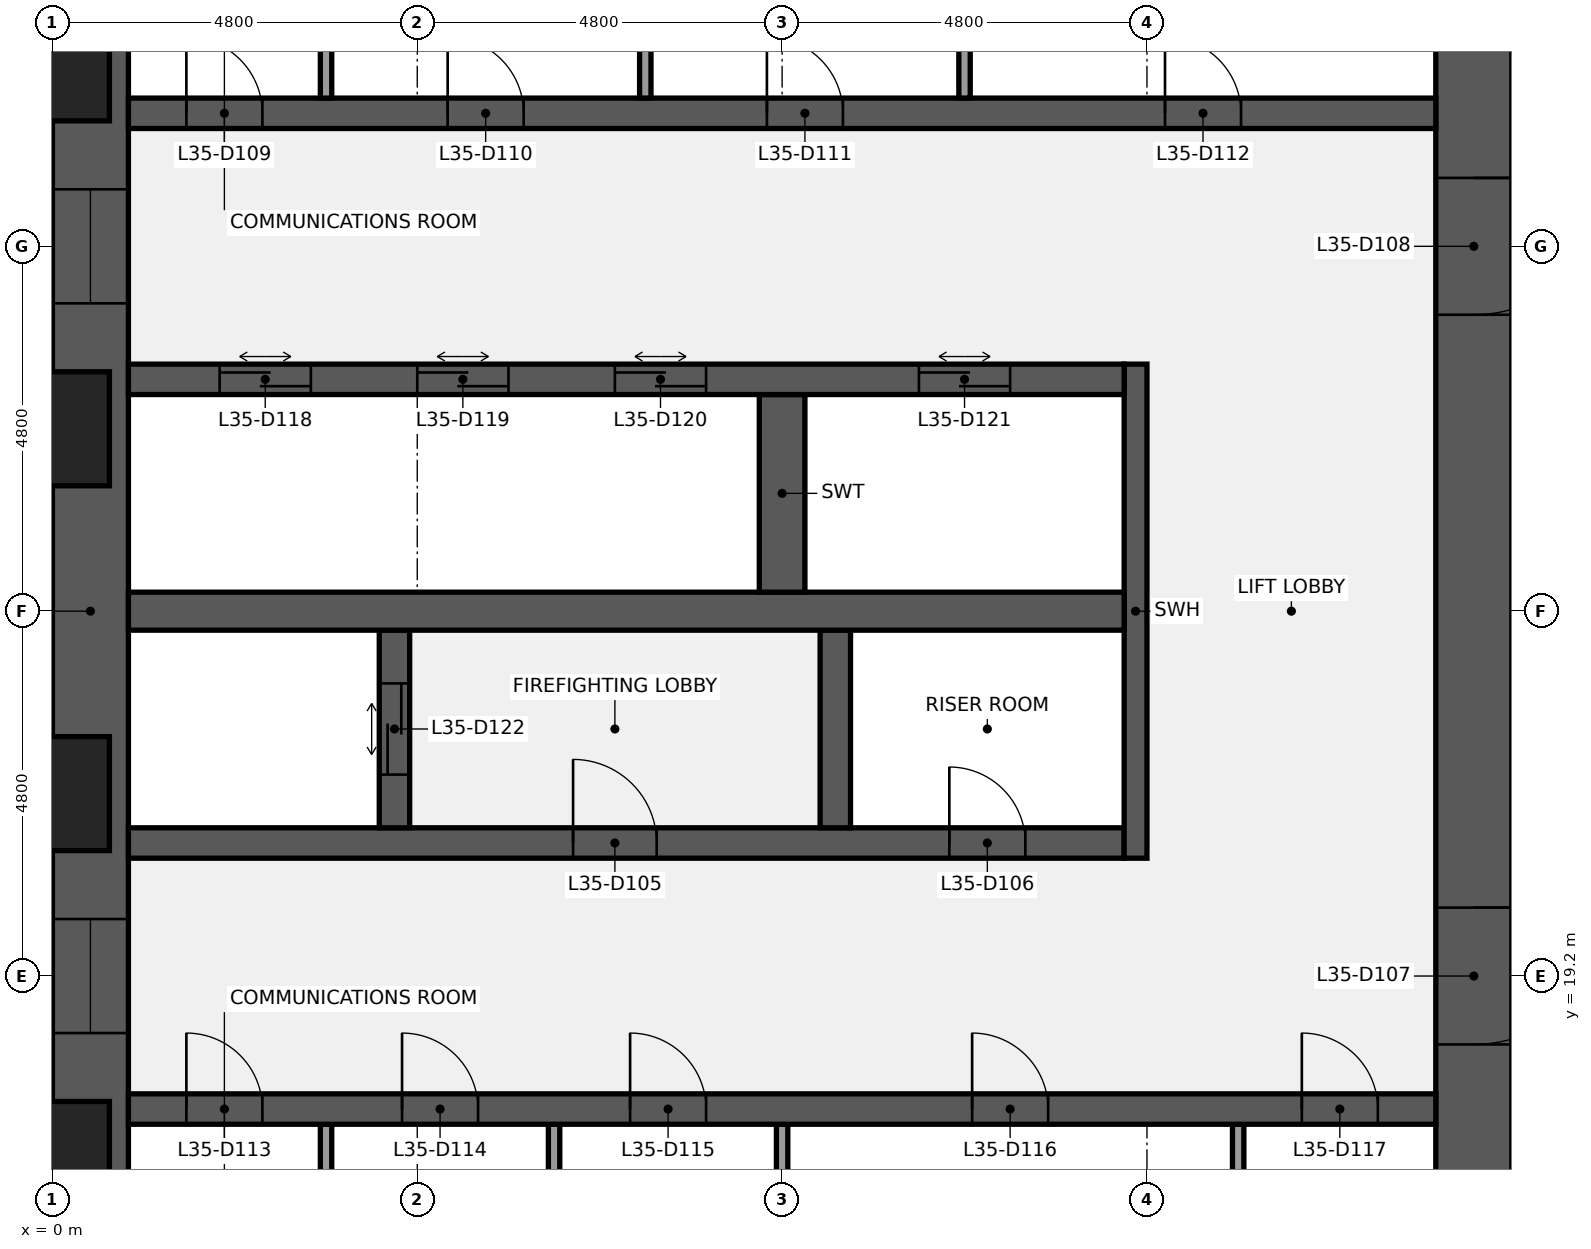
"""IFC4 building model, lengths in metres.
Left out: names, types, materials, properties, quantities, classifications, styles, units other than length and angle.
Written with IfcOpenShell. Run it as: python <this file> out.ifc"""

import sys

from ifc_helpers import new_model, si_unit, direction, frame, frame_2d, origin, place, context, subcontext, project, spatial, rectangle, extrude, element, fill, save


model = new_model("IFC4")
c1 = context("Model", 3, precision=1e-05, world=origin(), true_north=direction((0.0, 1.0)))
c2 = subcontext(c1, "Body", "Model", "MODEL_VIEW")
j1 = project(units=[si_unit("LENGTHUNIT", "METRE"), si_unit("PLANEANGLEUNIT", "RADIAN")], contexts=[c1])
p1 = place(None, origin())
s1 = spatial("IfcSite", under=j1, at=p1, CompositionType="ELEMENT")
p2 = place(p1, origin())
s2 = spatial("IfcBuilding", under=s1, at=p2, CompositionType="ELEMENT")
p3 = place(p2, frame((0.0, 0.0, 160.1)))
s3 = spatial("IfcBuildingStorey", under=s2, at=p3, CompositionType="ELEMENT", Elevation=160.1)
p4 = place(p3, frame((0.5, 9.6, 0.0), z_axis=(0.0, 0.0, 1.0), x_axis=(0.0, 1.0, 0.0)))
e1 = element("IfcWall", 1, at=p4, inside=s3, PredefinedType="SHEAR", context=c2, shape_type="SweptSolid", body=[
    extrude(rectangle(XDim=28.8, YDim=1.0, at=frame_2d((14.4, 0.0))), origin(), (0.0, 0.0, 1.0), 3.84),
])
p5 = place(p4, frame((8.85, 0.0, 0.9)))
e2 = element("IfcOpeningElement", 2, at=p5, cuts=e1, PredefinedType="OPENING", context=c2, shape_type="SweptSolid", body=[
    extrude(rectangle(XDim=1.5, YDim=1.5, at=frame_2d((0.75, 0.75))), frame((0.0, 0.51, 0.0), z_axis=(0.0, -1.0, 0.0), x_axis=(1.0, 0.0, 0.0)), (0.0, 0.0, 1.0), 1.02),
])
p6 = place(p4, frame((18.45, 0.0, 0.9)))
e3 = element("IfcOpeningElement", 3, at=p6, cuts=e1, PredefinedType="OPENING", context=c2, shape_type="SweptSolid", body=[
    extrude(rectangle(XDim=1.5, YDim=1.5, at=frame_2d((0.75, 0.75))), frame((0.0, 0.51, 0.0), z_axis=(0.0, -1.0, 0.0), x_axis=(1.0, 0.0, 0.0)), (0.0, 0.0, 1.0), 1.02),
])
p7 = place(p3, frame((18.7, 38.4, 0.0), z_axis=(0.0, 0.0, 1.0), x_axis=(0.0, -1.0, 0.0)))
e4 = element("IfcWall", 4, at=p7, inside=s3, PredefinedType="SHEAR", context=c2, shape_type="SweptSolid", body=[
    extrude(rectangle(XDim=28.8, YDim=1.0, at=frame_2d((14.4, 0.0))), origin(), (0.0, 0.0, 1.0), 3.84),
])
p8 = place(p7, frame((18.3, 0.0, 0.0)))
e5 = element("IfcOpeningElement", 5, at=p8, cuts=e4, PredefinedType="OPENING", context=c2, shape_type="SweptSolid", body=[
    extrude(rectangle(XDim=1.8, YDim=2.1, at=frame_2d((0.9, 1.05))), frame((0.0, 0.51, 0.0), z_axis=(0.0, -1.0, 0.0), x_axis=(1.0, 0.0, 0.0)), (0.0, 0.0, 1.0), 1.02),
])
p9 = place(p7, frame((8.7, 0.0, 0.0)))
e6 = element("IfcOpeningElement", 6, at=p9, cuts=e4, PredefinedType="OPENING", context=c2, shape_type="SweptSolid", body=[
    extrude(rectangle(XDim=1.8, YDim=2.1, at=frame_2d((0.9, 1.05))), frame((0.0, 0.51, 0.0), z_axis=(0.0, -1.0, 0.0), x_axis=(1.0, 0.0, 0.0)), (0.0, 0.0, 1.0), 1.02),
])
for number, where, z_axis, x_axis in (
    (7, (3.6, 14.65, 0.0), (0.0, 0.0, 1.0), (0.0, 1.0, 0.0)),
    (8, (6.6, 14.65, 0.0), (0.0, 0.0, 1.0), (0.0, 1.0, 0.0)),
    (9, (9.6, 14.65, 0.0), (0.0, 0.0, 1.0), (0.0, 1.0, 0.0)),
    (10, (15.6, 14.65, 0.0), (0.0, 0.0, 1.0), (0.0, 1.0, 0.0)),
):
    element("IfcWall", number, at=place(p3, frame(where, z_axis=z_axis, x_axis=x_axis)), inside=s3, PredefinedType="PARTITIONING", context=c2, shape_type="SweptSolid", body=[
        extrude(rectangle(XDim=2.6, YDim=0.15, at=frame_2d((1.3, 0.0))), origin(), (0.0, 0.0, 1.0), 3.84),
    ])
p10 = place(p3, frame((1.0, 17.45, 0.0), z_axis=(0.0, 0.0, 1.0), x_axis=(1.0, 0.0, 0.0)))
e11 = element("IfcWall", 11, at=p10, inside=s3, PredefinedType="SHEAR", context=c2, shape_type="SweptSolid", body=[
    extrude(rectangle(XDim=17.2, YDim=0.4, at=frame_2d((8.6, 0.0))), origin(), (0.0, 0.0, 1.0), 3.84),
])
p11 = place(p10, frame((0.762, 0.0, 0.0)))
e12 = element("IfcOpeningElement", 12, at=p11, cuts=e11, PredefinedType="OPENING", context=c2, shape_type="SweptSolid", body=[
    extrude(rectangle(XDim=1.0, YDim=2.1, at=frame_2d((0.5, 1.05))), frame((0.0, 0.21, 0.0), z_axis=(0.0, -1.0, 0.0), x_axis=(1.0, 0.0, 0.0)), (0.0, 0.0, 1.0), 0.42),
])
p12 = place(p10, frame((3.6, 0.0, 0.0)))
e13 = element("IfcOpeningElement", 13, at=p12, cuts=e11, PredefinedType="OPENING", context=c2, shape_type="SweptSolid", body=[
    extrude(rectangle(XDim=1.0, YDim=2.1, at=frame_2d((0.5, 1.05))), frame((0.0, 0.21, 0.0), z_axis=(0.0, -1.0, 0.0), x_axis=(1.0, 0.0, 0.0)), (0.0, 0.0, 1.0), 0.42),
])
p13 = place(p10, frame((6.6, 0.0, 0.0)))
e14 = element("IfcOpeningElement", 14, at=p13, cuts=e11, PredefinedType="OPENING", context=c2, shape_type="SweptSolid", body=[
    extrude(rectangle(XDim=1.0, YDim=2.1, at=frame_2d((0.5, 1.05))), frame((0.0, 0.21, 0.0), z_axis=(0.0, -1.0, 0.0), x_axis=(1.0, 0.0, 0.0)), (0.0, 0.0, 1.0), 0.42),
])
p14 = place(p10, frame((11.1, 0.0, 0.0)))
e15 = element("IfcOpeningElement", 15, at=p14, cuts=e11, PredefinedType="OPENING", context=c2, shape_type="SweptSolid", body=[
    extrude(rectangle(XDim=1.0, YDim=2.1, at=frame_2d((0.5, 1.05))), frame((0.0, 0.21, 0.0), z_axis=(0.0, -1.0, 0.0), x_axis=(1.0, 0.0, 0.0)), (0.0, 0.0, 1.0), 0.42),
])
p15 = place(p10, frame((15.438, 0.0, 0.0)))
e16 = element("IfcOpeningElement", 16, at=p15, cuts=e11, PredefinedType="OPENING", context=c2, shape_type="SweptSolid", body=[
    extrude(rectangle(XDim=1.0, YDim=2.1, at=frame_2d((0.5, 1.05))), frame((0.0, 0.21, 0.0), z_axis=(0.0, -1.0, 0.0), x_axis=(1.0, 0.0, 0.0)), (0.0, 0.0, 1.0), 0.42),
])
p16 = place(p3, frame((1.0, 20.95, 0.0), z_axis=(0.0, 0.0, 1.0), x_axis=(1.0, 0.0, 0.0)))
e17 = element("IfcWall", 17, at=p16, inside=s3, PredefinedType="SHEAR", context=c2, shape_type="SweptSolid", body=[
    extrude(rectangle(XDim=13.1, YDim=0.4, at=frame_2d((6.55, 0.0))), origin(), (0.0, 0.0, 1.0), 3.84),
])
p17 = place(p16, frame((5.85, 0.0, 0.0)))
e18 = element("IfcOpeningElement", 18, at=p17, cuts=e17, PredefinedType="OPENING", context=c2, shape_type="SweptSolid", body=[
    extrude(rectangle(XDim=1.1, YDim=2.1, at=frame_2d((0.55, 1.05))), frame((0.0, 0.21, 0.0), z_axis=(0.0, -1.0, 0.0), x_axis=(1.0, 0.0, 0.0)), (0.0, 0.0, 1.0), 0.42),
])
p18 = place(p16, frame((10.8, 0.0, 0.0)))
e19 = element("IfcOpeningElement", 19, at=p18, cuts=e17, PredefinedType="OPENING", context=c2, shape_type="SweptSolid", body=[
    extrude(rectangle(XDim=1.0, YDim=2.1, at=frame_2d((0.5, 1.05))), frame((0.0, 0.21, 0.0), z_axis=(0.0, -1.0, 0.0), x_axis=(1.0, 0.0, 0.0)), (0.0, 0.0, 1.0), 0.42),
])
p19 = place(p3, frame((14.25, 20.75, 0.0), z_axis=(0.0, 0.0, 1.0), x_axis=(0.0, 1.0, 0.0)))
e20 = element("IfcWall", 20, at=p19, inside=s3, PredefinedType="SHEAR", context=c2, shape_type="SweptSolid", body=[
    extrude(rectangle(XDim=6.5, YDim=0.3, at=frame_2d((3.25, 0.0))), origin(), (0.0, 0.0, 1.0), 3.84),
])
p20 = place(p3, frame((4.5, 21.15, 0.0), z_axis=(0.0, 0.0, 1.0), x_axis=(0.0, 1.0, 0.0)))
e21 = element("IfcWall", 21, at=p20, inside=s3, PredefinedType="SHEAR", context=c2, shape_type="SweptSolid", body=[
    extrude(rectangle(XDim=2.6, YDim=0.4, at=frame_2d((1.3, 0.0))), origin(), (0.0, 0.0, 1.0), 3.84),
])
p21 = place(p20, frame((0.7, 0.0, 0.0)))
e22 = element("IfcOpeningElement", 22, at=p21, cuts=e21, PredefinedType="OPENING", context=c2, shape_type="SweptSolid", body=[
    extrude(rectangle(XDim=1.2, YDim=2.1, at=frame_2d((0.6, 1.05))), frame((0.0, 0.21, 0.0), z_axis=(0.0, -1.0, 0.0), x_axis=(1.0, 0.0, 0.0)), (0.0, 0.0, 1.0), 0.42),
])
p22 = place(p3, frame((10.3, 21.15, 0.0), z_axis=(0.0, 0.0, 1.0), x_axis=(0.0, 1.0, 0.0)))
e23 = element("IfcWall", 23, at=p22, inside=s3, PredefinedType="SHEAR", context=c2, shape_type="SweptSolid", body=[
    extrude(rectangle(XDim=2.6, YDim=0.4, at=frame_2d((1.3, 0.0))), origin(), (0.0, 0.0, 1.0), 3.84),
])
p23 = place(p3, frame((1.0, 24.0, 0.0), z_axis=(0.0, 0.0, 1.0), x_axis=(1.0, 0.0, 0.0)))
e24 = element("IfcWall", 24, at=p23, inside=s3, PredefinedType="SHEAR", context=c2, shape_type="SweptSolid", body=[
    extrude(rectangle(XDim=13.1, YDim=0.5, at=frame_2d((6.55, 0.0))), origin(), (0.0, 0.0, 1.0), 3.84),
])
p24 = place(p3, frame((9.6, 24.25, 0.0), z_axis=(0.0, 0.0, 1.0), x_axis=(0.0, 1.0, 0.0)))
e25 = element("IfcWall", 25, at=p24, inside=s3, PredefinedType="SHEAR", context=c2, shape_type="SweptSolid", body=[
    extrude(rectangle(XDim=2.6, YDim=0.6, at=frame_2d((1.3, 0.0))), origin(), (0.0, 0.0, 1.0), 3.84),
])
p25 = place(p3, frame((1.0, 27.05, 0.0), z_axis=(0.0, 0.0, 1.0), x_axis=(1.0, 0.0, 0.0)))
e26 = element("IfcWall", 26, at=p25, inside=s3, PredefinedType="SHEAR", context=c2, shape_type="SweptSolid", body=[
    extrude(rectangle(XDim=13.1, YDim=0.4, at=frame_2d((6.55, 0.0))), origin(), (0.0, 0.0, 1.0), 3.84),
])
p26 = place(p25, frame((1.2, 0.0, 0.0)))
e27 = element("IfcOpeningElement", 27, at=p26, cuts=e26, PredefinedType="OPENING", context=c2, shape_type="SweptSolid", body=[
    extrude(rectangle(XDim=1.2, YDim=2.1, at=frame_2d((0.6, 1.05))), frame((0.0, 0.21, 0.0), z_axis=(0.0, -1.0, 0.0), x_axis=(1.0, 0.0, 0.0)), (0.0, 0.0, 1.0), 0.42),
])
p27 = place(p25, frame((3.8, 0.0, 0.0)))
e28 = element("IfcOpeningElement", 28, at=p27, cuts=e26, PredefinedType="OPENING", context=c2, shape_type="SweptSolid", body=[
    extrude(rectangle(XDim=1.2, YDim=2.1, at=frame_2d((0.6, 1.05))), frame((0.0, 0.21, 0.0), z_axis=(0.0, -1.0, 0.0), x_axis=(1.0, 0.0, 0.0)), (0.0, 0.0, 1.0), 0.42),
])
p28 = place(p25, frame((6.4, 0.0, 0.0)))
e29 = element("IfcOpeningElement", 29, at=p28, cuts=e26, PredefinedType="OPENING", context=c2, shape_type="SweptSolid", body=[
    extrude(rectangle(XDim=1.2, YDim=2.1, at=frame_2d((0.6, 1.05))), frame((0.0, 0.21, 0.0), z_axis=(0.0, -1.0, 0.0), x_axis=(1.0, 0.0, 0.0)), (0.0, 0.0, 1.0), 0.42),
])
p29 = place(p25, frame((10.4, 0.0, 0.0)))
e30 = element("IfcOpeningElement", 30, at=p29, cuts=e26, PredefinedType="OPENING", context=c2, shape_type="SweptSolid", body=[
    extrude(rectangle(XDim=1.2, YDim=2.1, at=frame_2d((0.6, 1.05))), frame((0.0, 0.21, 0.0), z_axis=(0.0, -1.0, 0.0), x_axis=(1.0, 0.0, 0.0)), (0.0, 0.0, 1.0), 0.42),
])
p30 = place(p3, frame((1.0, 30.55, 0.0), z_axis=(0.0, 0.0, 1.0), x_axis=(1.0, 0.0, 0.0)))
e31 = element("IfcWall", 31, at=p30, inside=s3, PredefinedType="SHEAR", context=c2, shape_type="SweptSolid", body=[
    extrude(rectangle(XDim=17.2, YDim=0.4, at=frame_2d((8.6, 0.0))), origin(), (0.0, 0.0, 1.0), 3.84),
])
p31 = place(p30, frame((0.762, 0.0, 0.0)))
e32 = element("IfcOpeningElement", 32, at=p31, cuts=e31, PredefinedType="OPENING", context=c2, shape_type="SweptSolid", body=[
    extrude(rectangle(XDim=1.0, YDim=2.1, at=frame_2d((0.5, 1.05))), frame((0.0, 0.21, 0.0), z_axis=(0.0, -1.0, 0.0), x_axis=(1.0, 0.0, 0.0)), (0.0, 0.0, 1.0), 0.42),
])
p32 = place(p30, frame((4.2, 0.0, 0.0)))
e33 = element("IfcOpeningElement", 33, at=p32, cuts=e31, PredefinedType="OPENING", context=c2, shape_type="SweptSolid", body=[
    extrude(rectangle(XDim=1.0, YDim=2.1, at=frame_2d((0.5, 1.05))), frame((0.0, 0.21, 0.0), z_axis=(0.0, -1.0, 0.0), x_axis=(1.0, 0.0, 0.0)), (0.0, 0.0, 1.0), 0.42),
])
p33 = place(p30, frame((8.4, 0.0, 0.0)))
e34 = element("IfcOpeningElement", 34, at=p33, cuts=e31, PredefinedType="OPENING", context=c2, shape_type="SweptSolid", body=[
    extrude(rectangle(XDim=1.0, YDim=2.1, at=frame_2d((0.5, 1.05))), frame((0.0, 0.21, 0.0), z_axis=(0.0, -1.0, 0.0), x_axis=(1.0, 0.0, 0.0)), (0.0, 0.0, 1.0), 0.42),
])
p34 = place(p30, frame((13.637, 0.0, 0.0)))
e35 = element("IfcOpeningElement", 35, at=p34, cuts=e31, PredefinedType="OPENING", context=c2, shape_type="SweptSolid", body=[
    extrude(rectangle(XDim=1.0, YDim=2.1, at=frame_2d((0.5, 1.05))), frame((0.0, 0.21, 0.0), z_axis=(0.0, -1.0, 0.0), x_axis=(1.0, 0.0, 0.0)), (0.0, 0.0, 1.0), 0.42),
])
for number, where, z_axis, x_axis in (
    (36, (3.6, 30.75, 0.0), (0.0, 0.0, 1.0), (0.0, 1.0, 0.0)),
    (37, (7.8, 30.75, 0.0), (0.0, 0.0, 1.0), (0.0, 1.0, 0.0)),
    (38, (12.0, 30.75, 0.0), (0.0, 0.0, 1.0), (0.0, 1.0, 0.0)),
):
    element("IfcWall", number, at=place(p3, frame(where, z_axis=z_axis, x_axis=x_axis)), inside=s3, PredefinedType="PARTITIONING", context=c2, shape_type="SweptSolid", body=[
        extrude(rectangle(XDim=2.6, YDim=0.15, at=frame_2d((1.3, 0.0))), origin(), (0.0, 0.0, 1.0), 3.84),
    ])
p35 = place(p17, origin())
e39 = element("IfcDoor", 39, at=p35, inside=s3, OperationType="SINGLE_SWING_LEFT", PredefinedType="DOOR", context=c2, shape_type="SweptSolid", body=[
    extrude(rectangle(XDim=1.1, YDim=2.1, at=frame_2d((0.55, 1.05))), frame((0.0, 0.025, 0.0), z_axis=(0.0, -1.0, 0.0), x_axis=(1.0, 0.0, 0.0)), (0.0, 0.0, 1.0), 0.05),
])
fill(e18, e39)
p36 = place(p18, origin())
e40 = element("IfcDoor", 40, at=p36, inside=s3, OperationType="SINGLE_SWING_LEFT", PredefinedType="DOOR", context=c2, shape_type="SweptSolid", body=[
    extrude(rectangle(XDim=1.0, YDim=2.1, at=frame_2d((0.5, 1.05))), frame((0.0, 0.025, 0.0), z_axis=(0.0, -1.0, 0.0), x_axis=(1.0, 0.0, 0.0)), (0.0, 0.0, 1.0), 0.05),
])
fill(e19, e40)
p37 = place(p8, origin())
e41 = element("IfcDoor", 41, at=p37, inside=s3, OperationType="DOUBLE_DOOR_SINGLE_SWING", PredefinedType="DOOR", context=c2, shape_type="SweptSolid", body=[
    extrude(rectangle(XDim=1.8, YDim=2.1, at=frame_2d((0.9, 1.05))), frame((0.0, 0.025, 0.0), z_axis=(0.0, -1.0, 0.0), x_axis=(1.0, 0.0, 0.0)), (0.0, 0.0, 1.0), 0.05),
])
fill(e5, e41)
p38 = place(p9, origin())
e42 = element("IfcDoor", 42, at=p38, inside=s3, OperationType="DOUBLE_DOOR_SINGLE_SWING", PredefinedType="DOOR", context=c2, shape_type="SweptSolid", body=[
    extrude(rectangle(XDim=1.8, YDim=2.1, at=frame_2d((0.9, 1.05))), frame((0.0, 0.025, 0.0), z_axis=(0.0, -1.0, 0.0), x_axis=(1.0, 0.0, 0.0)), (0.0, 0.0, 1.0), 0.05),
])
fill(e6, e42)
p39 = place(p31, origin())
e43 = element("IfcDoor", 43, at=p39, inside=s3, OperationType="SINGLE_SWING_LEFT", PredefinedType="DOOR", context=c2, shape_type="SweptSolid", body=[
    extrude(rectangle(XDim=1.0, YDim=2.1, at=frame_2d((0.5, 1.05))), frame((0.0, 0.025, 0.0), z_axis=(0.0, -1.0, 0.0), x_axis=(1.0, 0.0, 0.0)), (0.0, 0.0, 1.0), 0.05),
])
fill(e32, e43)
p40 = place(p32, origin())
e44 = element("IfcDoor", 44, at=p40, inside=s3, OperationType="SINGLE_SWING_LEFT", PredefinedType="DOOR", context=c2, shape_type="SweptSolid", body=[
    extrude(rectangle(XDim=1.0, YDim=2.1, at=frame_2d((0.5, 1.05))), frame((0.0, 0.025, 0.0), z_axis=(0.0, -1.0, 0.0), x_axis=(1.0, 0.0, 0.0)), (0.0, 0.0, 1.0), 0.05),
])
fill(e33, e44)
p41 = place(p33, origin())
e45 = element("IfcDoor", 45, at=p41, inside=s3, OperationType="SINGLE_SWING_LEFT", PredefinedType="DOOR", context=c2, shape_type="SweptSolid", body=[
    extrude(rectangle(XDim=1.0, YDim=2.1, at=frame_2d((0.5, 1.05))), frame((0.0, 0.025, 0.0), z_axis=(0.0, -1.0, 0.0), x_axis=(1.0, 0.0, 0.0)), (0.0, 0.0, 1.0), 0.05),
])
fill(e34, e45)
p42 = place(p34, origin())
e46 = element("IfcDoor", 46, at=p42, inside=s3, OperationType="SINGLE_SWING_LEFT", PredefinedType="DOOR", context=c2, shape_type="SweptSolid", body=[
    extrude(rectangle(XDim=1.0, YDim=2.1, at=frame_2d((0.5, 1.05))), frame((0.0, 0.025, 0.0), z_axis=(0.0, -1.0, 0.0), x_axis=(1.0, 0.0, 0.0)), (0.0, 0.0, 1.0), 0.05),
])
fill(e35, e46)
p43 = place(p11, origin())
e47 = element("IfcDoor", 47, at=p43, inside=s3, OperationType="SINGLE_SWING_LEFT", PredefinedType="DOOR", context=c2, shape_type="SweptSolid", body=[
    extrude(rectangle(XDim=1.0, YDim=2.1, at=frame_2d((0.5, 1.05))), frame((0.0, 0.025, 0.0), z_axis=(0.0, -1.0, 0.0), x_axis=(1.0, 0.0, 0.0)), (0.0, 0.0, 1.0), 0.05),
])
fill(e12, e47)
p44 = place(p12, origin())
e48 = element("IfcDoor", 48, at=p44, inside=s3, OperationType="SINGLE_SWING_LEFT", PredefinedType="DOOR", context=c2, shape_type="SweptSolid", body=[
    extrude(rectangle(XDim=1.0, YDim=2.1, at=frame_2d((0.5, 1.05))), frame((0.0, 0.025, 0.0), z_axis=(0.0, -1.0, 0.0), x_axis=(1.0, 0.0, 0.0)), (0.0, 0.0, 1.0), 0.05),
])
fill(e13, e48)
p45 = place(p13, origin())
e49 = element("IfcDoor", 49, at=p45, inside=s3, OperationType="SINGLE_SWING_LEFT", PredefinedType="DOOR", context=c2, shape_type="SweptSolid", body=[
    extrude(rectangle(XDim=1.0, YDim=2.1, at=frame_2d((0.5, 1.05))), frame((0.0, 0.025, 0.0), z_axis=(0.0, -1.0, 0.0), x_axis=(1.0, 0.0, 0.0)), (0.0, 0.0, 1.0), 0.05),
])
fill(e14, e49)
p46 = place(p14, origin())
e50 = element("IfcDoor", 50, at=p46, inside=s3, OperationType="SINGLE_SWING_LEFT", PredefinedType="DOOR", context=c2, shape_type="SweptSolid", body=[
    extrude(rectangle(XDim=1.0, YDim=2.1, at=frame_2d((0.5, 1.05))), frame((0.0, 0.025, 0.0), z_axis=(0.0, -1.0, 0.0), x_axis=(1.0, 0.0, 0.0)), (0.0, 0.0, 1.0), 0.05),
])
fill(e15, e50)
p47 = place(p15, origin())
e51 = element("IfcDoor", 51, at=p47, inside=s3, OperationType="SINGLE_SWING_LEFT", PredefinedType="DOOR", context=c2, shape_type="SweptSolid", body=[
    extrude(rectangle(XDim=1.0, YDim=2.1, at=frame_2d((0.5, 1.05))), frame((0.0, 0.025, 0.0), z_axis=(0.0, -1.0, 0.0), x_axis=(1.0, 0.0, 0.0)), (0.0, 0.0, 1.0), 0.05),
])
fill(e16, e51)
p48 = place(p26, origin())
e52 = element("IfcDoor", 52, at=p48, inside=s3, OperationType="DOUBLE_DOOR_SLIDING", PredefinedType="DOOR", context=c2, shape_type="SweptSolid", body=[
    extrude(rectangle(XDim=1.2, YDim=2.1, at=frame_2d((0.6, 1.05))), frame((0.0, 0.025, 0.0), z_axis=(0.0, -1.0, 0.0), x_axis=(1.0, 0.0, 0.0)), (0.0, 0.0, 1.0), 0.05),
])
fill(e27, e52)
p49 = place(p27, origin())
e53 = element("IfcDoor", 53, at=p49, inside=s3, OperationType="DOUBLE_DOOR_SLIDING", PredefinedType="DOOR", context=c2, shape_type="SweptSolid", body=[
    extrude(rectangle(XDim=1.2, YDim=2.1, at=frame_2d((0.6, 1.05))), frame((0.0, 0.025, 0.0), z_axis=(0.0, -1.0, 0.0), x_axis=(1.0, 0.0, 0.0)), (0.0, 0.0, 1.0), 0.05),
])
fill(e28, e53)
p50 = place(p28, origin())
e54 = element("IfcDoor", 54, at=p50, inside=s3, OperationType="DOUBLE_DOOR_SLIDING", PredefinedType="DOOR", context=c2, shape_type="SweptSolid", body=[
    extrude(rectangle(XDim=1.2, YDim=2.1, at=frame_2d((0.6, 1.05))), frame((0.0, 0.025, 0.0), z_axis=(0.0, -1.0, 0.0), x_axis=(1.0, 0.0, 0.0)), (0.0, 0.0, 1.0), 0.05),
])
fill(e29, e54)
p51 = place(p29, origin())
e55 = element("IfcDoor", 55, at=p51, inside=s3, OperationType="DOUBLE_DOOR_SLIDING", PredefinedType="DOOR", context=c2, shape_type="SweptSolid", body=[
    extrude(rectangle(XDim=1.2, YDim=2.1, at=frame_2d((0.6, 1.05))), frame((0.0, 0.025, 0.0), z_axis=(0.0, -1.0, 0.0), x_axis=(1.0, 0.0, 0.0)), (0.0, 0.0, 1.0), 0.05),
])
fill(e30, e55)
p52 = place(p21, origin())
e56 = element("IfcDoor", 56, at=p52, inside=s3, OperationType="DOUBLE_DOOR_SLIDING", PredefinedType="DOOR", context=c2, shape_type="SweptSolid", body=[
    extrude(rectangle(XDim=1.2, YDim=2.1, at=frame_2d((0.6, 1.05))), frame((0.0, 0.025, 0.0), z_axis=(0.0, -1.0, 0.0), x_axis=(1.0, 0.0, 0.0)), (0.0, 0.0, 1.0), 0.05),
])
fill(e22, e56)
p53 = place(p5, origin())
e57 = element("IfcWindow", 57, at=p53, inside=s3, PartitioningType="SINGLE_PANEL", PredefinedType="WINDOW", context=c2, shape_type="SweptSolid", body=[
    extrude(rectangle(XDim=1.5, YDim=1.5, at=frame_2d((0.75, 0.75))), frame((0.0, 0.03, 0.0), z_axis=(0.0, -1.0, 0.0), x_axis=(1.0, 0.0, 0.0)), (0.0, 0.0, 1.0), 0.06),
])
fill(e2, e57)
p54 = place(p6, origin())
e58 = element("IfcWindow", 58, at=p54, inside=s3, PartitioningType="SINGLE_PANEL", PredefinedType="WINDOW", context=c2, shape_type="SweptSolid", body=[
    extrude(rectangle(XDim=1.5, YDim=1.5, at=frame_2d((0.75, 0.75))), frame((0.0, 0.03, 0.0), z_axis=(0.0, -1.0, 0.0), x_axis=(1.0, 0.0, 0.0)), (0.0, 0.0, 1.0), 0.06),
])
fill(e3, e58)
save(model, sys.argv[1])
